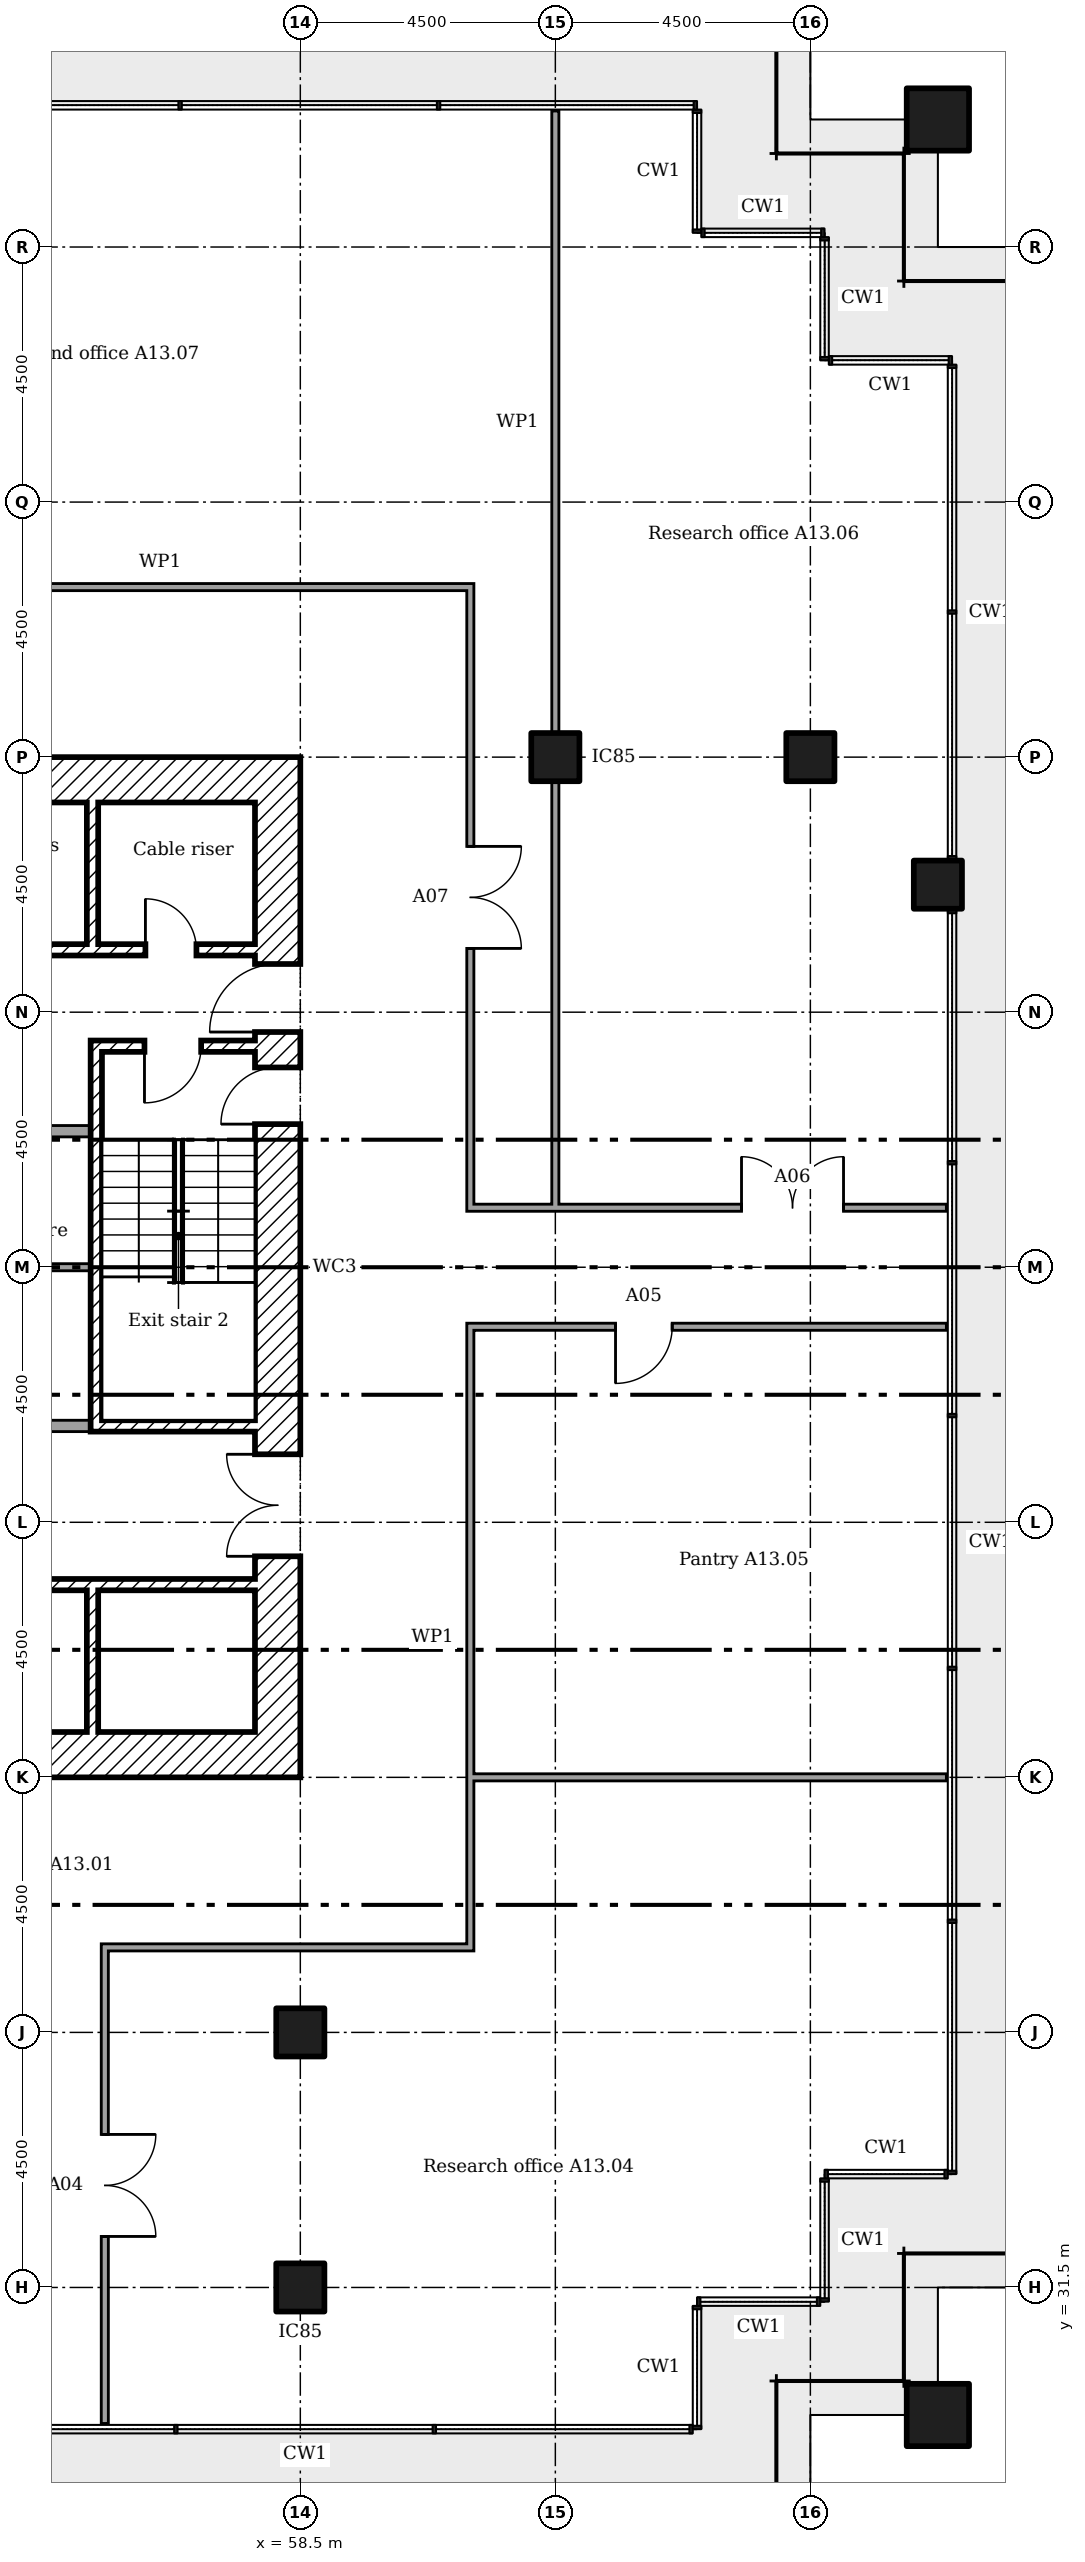
"""IFC4 building model, lengths in metres.
Left out: names, types, materials, properties, quantities, classifications, styles, units other than length and angle.
Written with IfcOpenShell. Run it as: python <this file> out.ifc"""

import sys

from ifc_helpers import new_model, si_unit, direction, frame, frame_2d, origin, origin_2d, place, context, subcontext, project, spatial, rectangle, extrude, element, fill, save


model = new_model("IFC4")
c1 = context("Model", 3, precision=1e-05, world=origin(), true_north=direction((0.0, 1.0)))
c2 = subcontext(c1, "Body", "Model", "MODEL_VIEW")
j1 = project(units=[si_unit("LENGTHUNIT", "METRE"), si_unit("PLANEANGLEUNIT", "RADIAN")], contexts=[c1])
p1 = place(None, origin())
s1 = spatial("IfcSite", under=j1, at=p1, CompositionType="ELEMENT")
p2 = place(p1, origin())
s2 = spatial("IfcBuilding", under=s1, at=p2, CompositionType="ELEMENT")
p3 = place(p2, frame((0.0, 0.0, 58.2)))
s3 = spatial("IfcBuildingStorey", under=s2, at=p3, CompositionType="ELEMENT", Elevation=58.2)
for number, where in (
    (1, (69.75, 29.25, 0.0)),
    (2, (69.75, 69.75, 0.0)),
):
    element("IfcColumn", number, at=place(p3, frame(where)), inside=s3, PredefinedType="COLUMN", context=c2, shape_type="SweptSolid", body=[
        extrude(rectangle(XDim=1.1, YDim=1.1, at=origin_2d()), origin(), (0.0, 0.0, 1.0), 3.6),
    ])
for number, where in (
    (3, (58.5, 31.5, 0.0)),
    (4, (58.5, 36.0, 0.0)),
    (5, (63.0, 58.5, 0.0)),
    (6, (67.5, 58.5, 0.0)),
    (7, (69.75, 56.25, 0.0)),
):
    element("IfcColumn", number, at=place(p3, frame(where)), inside=s3, PredefinedType="COLUMN", context=c2, shape_type="SweptSolid", body=[
        extrude(rectangle(XDim=0.85, YDim=0.85, at=origin_2d()), origin(), (0.0, 0.0, 1.0), 3.6),
    ])
p4 = place(p3, frame((58.1, 40.5, 0.0), z_axis=(0.0, 0.0, 1.0), x_axis=(0.0, 1.0, 0.0)))
e8 = element("IfcWall", 8, at=p4, inside=s3, PredefinedType="SHEAR", context=c2, shape_type="SweptSolid", body=[
    extrude(rectangle(XDim=18.0, YDim=0.8, at=frame_2d((9.0, 0.0))), origin(), (0.0, 0.0, 1.0), 3.35),
])
p5 = place(p4, frame((13.15, 0.0, 0.0)))
e9 = element("IfcOpeningElement", 9, at=p5, cuts=e8, PredefinedType="OPENING", context=c2, shape_type="SweptSolid", body=[
    extrude(rectangle(XDim=1.2, YDim=2.1, at=frame_2d((0.6, 1.05))), frame((0.0, 0.41, 0.0), z_axis=(0.0, -1.0, 0.0), x_axis=(1.0, 0.0, 0.0)), (0.0, 0.0, 1.0), 0.82),
])
p6 = place(p4, frame((3.9, 0.0, 0.0)))
e10 = element("IfcOpeningElement", 10, at=p6, cuts=e8, PredefinedType="OPENING", context=c2, shape_type="SweptSolid", body=[
    extrude(rectangle(XDim=1.8, YDim=2.1, at=frame_2d((0.9, 1.05))), frame((0.0, 0.41, 0.0), z_axis=(0.0, -1.0, 0.0), x_axis=(1.0, 0.0, 0.0)), (0.0, 0.0, 1.0), 0.82),
])
p7 = place(p4, frame((11.525, 0.0, 0.0)))
e11 = element("IfcOpeningElement", 11, at=p7, cuts=e8, PredefinedType="OPENING", context=c2, shape_type="SweptSolid", body=[
    extrude(rectangle(XDim=1.0, YDim=2.1, at=frame_2d((0.5, 1.05))), frame((0.0, 0.41, 0.0), z_axis=(0.0, -1.0, 0.0), x_axis=(1.0, 0.0, 0.0)), (0.0, 0.0, 1.0), 0.82),
])
for number, where in (
    (12, (41.3, 58.1, 0.0)),
    (13, (41.3, 40.9, 0.0)),
):
    element("IfcWall", number, at=place(p3, frame(where)), inside=s3, PredefinedType="SHEAR", context=c2, shape_type="SweptSolid", body=[
        extrude(rectangle(XDim=16.4, YDim=0.8, at=frame_2d((8.2, 0.0))), origin(), (0.0, 0.0, 1.0), 3.35),
    ])
for number, where, z_axis, x_axis in (
    (14, (54.833, 57.7, 0.0), (0.0, 0.0, 1.0), (0.0, -1.0, 0.0)),
    (15, (54.833, 41.3, 0.0), (0.0, 0.0, 1.0), (0.0, 1.0, 0.0)),
):
    element("IfcWall", number, at=place(p3, frame(where, z_axis=z_axis, x_axis=x_axis)), inside=s3, PredefinedType="SHEAR", context=c2, shape_type="SweptSolid", body=[
        extrude(rectangle(XDim=2.5, YDim=0.2, at=frame_2d((1.25, 0.0))), origin(), (0.0, 0.0, 1.0), 3.35),
    ])
p8 = place(p3, frame((46.933, 55.1, 0.0)))
e16 = element("IfcWall", 16, at=p8, inside=s3, PredefinedType="SHEAR", context=c2, shape_type="SweptSolid", body=[
    extrude(rectangle(XDim=10.767, YDim=0.2, at=frame_2d((5.383, 0.0))), origin(), (0.0, 0.0, 1.0), 3.35),
])
p9 = place(p8, frame((8.833, 0.0, 0.0)))
e17 = element("IfcOpeningElement", 17, at=p9, cuts=e16, PredefinedType="OPENING", context=c2, shape_type="SweptSolid", body=[
    extrude(rectangle(XDim=0.9, YDim=2.1, at=frame_2d((0.45, 1.05))), frame((0.0, 0.11, 0.0), z_axis=(0.0, -1.0, 0.0), x_axis=(1.0, 0.0, 0.0)), (0.0, 0.0, 1.0), 0.22),
])
p10 = place(p8, frame((2.117, 0.0, 0.0)))
e18 = element("IfcOpeningElement", 18, at=p10, cuts=e16, PredefinedType="OPENING", context=c2, shape_type="SweptSolid", body=[
    extrude(rectangle(XDim=0.9, YDim=2.1, at=frame_2d((0.45, 1.05))), frame((0.0, 0.11, 0.0), z_axis=(0.0, -1.0, 0.0), x_axis=(1.0, 0.0, 0.0)), (0.0, 0.0, 1.0), 0.22),
])
p11 = place(p8, frame((6.117, 0.0, 0.0)))
e19 = element("IfcOpeningElement", 19, at=p11, cuts=e16, PredefinedType="OPENING", context=c2, shape_type="SweptSolid", body=[
    extrude(rectangle(XDim=0.9, YDim=2.1, at=frame_2d((0.45, 1.05))), frame((0.0, 0.11, 0.0), z_axis=(0.0, -1.0, 0.0), x_axis=(1.0, 0.0, 0.0)), (0.0, 0.0, 1.0), 0.22),
])
p12 = place(p3, frame((41.3, 43.9, 0.0)))
e20 = element("IfcWall", 20, at=p12, inside=s3, PredefinedType="SHEAR", context=c2, shape_type="SweptSolid", body=[
    extrude(rectangle(XDim=16.4, YDim=0.2, at=frame_2d((8.2, 0.0))), origin(), (0.0, 0.0, 1.0), 3.35),
])
p13 = place(p12, frame((0.933, 0.0, 0.0)))
e21 = element("IfcOpeningElement", 21, at=p13, cuts=e20, PredefinedType="OPENING", context=c2, shape_type="SweptSolid", body=[
    extrude(rectangle(XDim=1.2, YDim=2.1, at=frame_2d((0.6, 1.05))), frame((0.0, 0.11, 0.0), z_axis=(0.0, -1.0, 0.0), x_axis=(1.0, 0.0, 0.0)), (0.0, 0.0, 1.0), 0.22),
])
p14 = place(p12, frame((3.6, 0.0, 0.0)))
e22 = element("IfcOpeningElement", 22, at=p14, cuts=e20, PredefinedType="OPENING", context=c2, shape_type="SweptSolid", body=[
    extrude(rectangle(XDim=1.2, YDim=2.1, at=frame_2d((0.6, 1.05))), frame((0.0, 0.11, 0.0), z_axis=(0.0, -1.0, 0.0), x_axis=(1.0, 0.0, 0.0)), (0.0, 0.0, 1.0), 0.22),
])
p15 = place(p12, frame((6.267, 0.0, 0.0)))
e23 = element("IfcOpeningElement", 23, at=p15, cuts=e20, PredefinedType="OPENING", context=c2, shape_type="SweptSolid", body=[
    extrude(rectangle(XDim=1.2, YDim=2.1, at=frame_2d((0.6, 1.05))), frame((0.0, 0.11, 0.0), z_axis=(0.0, -1.0, 0.0), x_axis=(1.0, 0.0, 0.0)), (0.0, 0.0, 1.0), 0.22),
])
p16 = place(p12, frame((8.933, 0.0, 0.0)))
e24 = element("IfcOpeningElement", 24, at=p16, cuts=e20, PredefinedType="OPENING", context=c2, shape_type="SweptSolid", body=[
    extrude(rectangle(XDim=1.2, YDim=2.1, at=frame_2d((0.6, 1.05))), frame((0.0, 0.11, 0.0), z_axis=(0.0, -1.0, 0.0), x_axis=(1.0, 0.0, 0.0)), (0.0, 0.0, 1.0), 0.22),
])
p17 = place(p3, frame((54.8, 53.4, 0.0)))
e25 = element("IfcWall", 25, at=p17, inside=s3, PredefinedType="SHEAR", context=c2, shape_type="SweptSolid", body=[
    extrude(rectangle(XDim=2.9, YDim=0.2, at=frame_2d((1.45, 0.0))), origin(), (0.0, 0.0, 1.0), 3.35),
])
p18 = place(p17, frame((0.95, 0.0, 0.0)))
e26 = element("IfcOpeningElement", 26, at=p18, cuts=e25, PredefinedType="OPENING", context=c2, shape_type="SweptSolid", body=[
    extrude(rectangle(XDim=1.0, YDim=2.1, at=frame_2d((0.5, 1.05))), frame((0.0, 0.11, 0.0), z_axis=(0.0, -1.0, 0.0), x_axis=(1.0, 0.0, 0.0)), (0.0, 0.0, 1.0), 0.22),
])
p19 = place(p3, frame((54.8, 46.7, 0.0)))
e27 = element("IfcWall", 27, at=p19, inside=s3, PredefinedType="SHEAR", context=c2, shape_type="SweptSolid", body=[
    extrude(rectangle(XDim=2.9, YDim=0.2, at=frame_2d((1.45, 0.0))), origin(), (0.0, 0.0, 1.0), 3.35),
])
p20 = place(p3, frame((54.9, 46.8, 0.0), z_axis=(0.0, 0.0, 1.0), x_axis=(0.0, 1.0, 0.0)))
e28 = element("IfcWall", 28, at=p20, inside=s3, PredefinedType="SHEAR", context=c2, shape_type="SweptSolid", body=[
    extrude(rectangle(XDim=6.5, YDim=0.2, at=frame_2d((3.25, 0.0))), origin(), (0.0, 0.0, 1.0), 3.35),
])
p21 = place(p3, frame((44.2, 51.9, 0.0)))
e29 = element("IfcWall", 29, at=p21, inside=s3, PredefinedType="PARTITIONING", context=c2, shape_type="SweptSolid", body=[
    extrude(rectangle(XDim=10.6, YDim=0.2, at=frame_2d((5.3, 0.0))), origin(), (0.0, 0.0, 1.0), 3.35),
])
p22 = place(p21, frame((8.5, 0.0, 0.0)))
e30 = element("IfcOpeningElement", 30, at=p22, cuts=e29, PredefinedType="OPENING", context=c2, shape_type="SweptSolid", body=[
    extrude(rectangle(XDim=0.9, YDim=2.1, at=frame_2d((0.45, 1.05))), frame((0.0, 0.11, 0.0), z_axis=(0.0, -1.0, 0.0), x_axis=(1.0, 0.0, 0.0)), (0.0, 0.0, 1.0), 0.22),
])
p23 = place(p3, frame((44.2, 46.7, 0.0)))
e31 = element("IfcWall", 31, at=p23, inside=s3, PredefinedType="PARTITIONING", context=c2, shape_type="SweptSolid", body=[
    extrude(rectangle(XDim=10.6, YDim=0.2, at=frame_2d((5.3, 0.0))), origin(), (0.0, 0.0, 1.0), 3.35),
])
p24 = place(p23, frame((2.0, 0.0, 0.0)))
e32 = element("IfcOpeningElement", 32, at=p24, cuts=e31, PredefinedType="OPENING", context=c2, shape_type="SweptSolid", body=[
    extrude(rectangle(XDim=0.9, YDim=2.1, at=frame_2d((0.45, 1.05))), frame((0.0, 0.11, 0.0), z_axis=(0.0, -1.0, 0.0), x_axis=(1.0, 0.0, 0.0)), (0.0, 0.0, 1.0), 0.22),
])
p25 = place(p23, frame((5.65, 0.0, 0.0)))
e33 = element("IfcOpeningElement", 33, at=p25, cuts=e31, PredefinedType="OPENING", context=c2, shape_type="SweptSolid", body=[
    extrude(rectangle(XDim=0.9, YDim=2.1, at=frame_2d((0.45, 1.05))), frame((0.0, 0.11, 0.0), z_axis=(0.0, -1.0, 0.0), x_axis=(1.0, 0.0, 0.0)), (0.0, 0.0, 1.0), 0.22),
])
p26 = place(p23, frame((8.5, 0.0, 0.0)))
e34 = element("IfcOpeningElement", 34, at=p26, cuts=e31, PredefinedType="OPENING", context=c2, shape_type="SweptSolid", body=[
    extrude(rectangle(XDim=0.9, YDim=2.1, at=frame_2d((0.45, 1.05))), frame((0.0, 0.11, 0.0), z_axis=(0.0, -1.0, 0.0), x_axis=(1.0, 0.0, 0.0)), (0.0, 0.0, 1.0), 0.22),
])
p27 = place(p3, frame((51.562, 49.5, 0.0)))
e35 = element("IfcWall", 35, at=p27, inside=s3, PredefinedType="PARTITIONING", context=c2, shape_type="SweptSolid", body=[
    extrude(rectangle(XDim=3.238, YDim=0.125, at=frame_2d((1.619, 0.0))), origin(), (0.0, 0.0, 1.0), 3.35),
])
p28 = place(p3, frame((54.988, 37.5, 0.0)))
e36 = element("IfcWall", 36, at=p28, inside=s3, PredefinedType="PARTITIONING", context=c2, shape_type="SweptSolid", body=[
    extrude(rectangle(XDim=6.575, YDim=0.125, at=frame_2d((3.288, 0.0))), origin(), (0.0, 0.0, 1.0), 3.45),
])
p29 = place(p3, frame((61.5, 40.5, 0.0)))
e37 = element("IfcWall", 37, at=p29, inside=s3, PredefinedType="PARTITIONING", context=c2, shape_type="SweptSolid", body=[
    extrude(rectangle(XDim=8.4, YDim=0.125, at=frame_2d((4.2, 0.0))), origin(), (0.0, 0.0, 1.0), 2.766),
])
p30 = place(p3, frame((61.438, 48.45, 0.0)))
e38 = element("IfcWall", 38, at=p30, inside=s3, PredefinedType="PARTITIONING", context=c2, shape_type="SweptSolid", body=[
    extrude(rectangle(XDim=8.462, YDim=0.125, at=frame_2d((4.231, 0.0))), origin(), (0.0, 0.0, 1.0), 3.45),
])
p31 = place(p30, frame((2.625, 0.0, 0.0)))
e39 = element("IfcOpeningElement", 39, at=p31, cuts=e38, PredefinedType="OPENING", context=c2, shape_type="SweptSolid", body=[
    extrude(rectangle(XDim=1.0, YDim=2.1, at=frame_2d((0.5, 1.05))), frame((0.0, 0.073, 0.0), z_axis=(0.0, -1.0, 0.0), x_axis=(1.0, 0.0, 0.0)), (0.0, 0.0, 1.0), 0.145),
])
p32 = place(p3, frame((61.438, 50.55, 0.0)))
e40 = element("IfcWall", 40, at=p32, inside=s3, PredefinedType="PARTITIONING", context=c2, shape_type="SweptSolid", body=[
    extrude(rectangle(XDim=8.462, YDim=0.125, at=frame_2d((4.231, 0.0))), origin(), (0.0, 0.0, 1.0), 3.45),
])
p33 = place(p32, frame((4.847, 0.0, 0.0)))
e41 = element("IfcOpeningElement", 41, at=p33, cuts=e40, PredefinedType="OPENING", context=c2, shape_type="SweptSolid", body=[
    extrude(rectangle(XDim=1.8, YDim=2.1, at=frame_2d((0.9, 1.05))), frame((0.0, 0.073, 0.0), z_axis=(0.0, -1.0, 0.0), x_axis=(1.0, 0.0, 0.0)), (0.0, 0.0, 1.0), 0.145),
])
p34 = place(p3, frame((50.488, 61.5, 0.0)))
e42 = element("IfcWall", 42, at=p34, inside=s3, PredefinedType="PARTITIONING", context=c2, shape_type="SweptSolid", body=[
    extrude(rectangle(XDim=11.075, YDim=0.125, at=frame_2d((5.538, 0.0))), origin(), (0.0, 0.0, 1.0), 3.45),
])
p35 = place(p3, frame((55.05, 29.1, 0.0), z_axis=(0.0, 0.0, 1.0), x_axis=(0.0, 1.0, 0.0)))
e43 = element("IfcWall", 43, at=p35, inside=s3, PredefinedType="PARTITIONING", context=c2, shape_type="SweptSolid", body=[
    extrude(rectangle(XDim=8.337, YDim=0.125, at=frame_2d((4.169, 0.0))), origin(), (0.0, 0.0, 1.0), 3.45),
])
p36 = place(p35, frame((3.3, 0.0, 0.0)))
e44 = element("IfcOpeningElement", 44, at=p36, cuts=e43, PredefinedType="OPENING", context=c2, shape_type="SweptSolid", body=[
    extrude(rectangle(XDim=1.8, YDim=2.1, at=frame_2d((0.9, 1.05))), frame((0.0, 0.073, 0.0), z_axis=(0.0, -1.0, 0.0), x_axis=(1.0, 0.0, 0.0)), (0.0, 0.0, 1.0), 0.145),
])
p37 = place(p3, frame((61.5, 37.562, 0.0), z_axis=(0.0, 0.0, 1.0), x_axis=(0.0, 1.0, 0.0)))
e45 = element("IfcWall", 45, at=p37, inside=s3, PredefinedType="PARTITIONING", context=c2, shape_type="SweptSolid", body=[
    extrude(rectangle(XDim=10.825, YDim=0.125, at=frame_2d((5.413, 0.0))), origin(), (0.0, 0.0, 1.0), 3.45),
])
p38 = place(p3, frame((61.5, 50.613, 0.0), z_axis=(0.0, 0.0, 1.0), x_axis=(0.0, 1.0, 0.0)))
e46 = element("IfcWall", 46, at=p38, inside=s3, PredefinedType="PARTITIONING", context=c2, shape_type="SweptSolid", body=[
    extrude(rectangle(XDim=10.825, YDim=0.125, at=frame_2d((5.413, 0.0))), origin(), (0.0, 0.0, 1.0), 3.45),
])
p39 = place(p38, frame((4.512, 0.0, 0.0)))
e47 = element("IfcOpeningElement", 47, at=p39, cuts=e46, PredefinedType="OPENING", context=c2, shape_type="SweptSolid", body=[
    extrude(rectangle(XDim=1.8, YDim=2.1, at=frame_2d((0.9, 1.05))), frame((0.0, 0.073, 0.0), z_axis=(0.0, -1.0, 0.0), x_axis=(1.0, 0.0, 0.0)), (0.0, 0.0, 1.0), 0.145),
])
p40 = place(p3, frame((63.0, 50.55, 0.0), z_axis=(0.0, 0.0, 1.0), x_axis=(0.0, 1.0, 0.0)))
e48 = element("IfcWall", 48, at=p40, inside=s3, PredefinedType="PARTITIONING", context=c2, shape_type="SweptSolid", body=[
    extrude(rectangle(XDim=7.525, YDim=0.125, at=frame_2d((3.762, 0.0))), origin(), (0.0, 0.0, 1.0), 3.45),
])
p41 = place(p3, frame((63.0, 58.925, 0.0), z_axis=(0.0, 0.0, 1.0), x_axis=(0.0, 1.0, 0.0)))
e49 = element("IfcWall", 49, at=p41, inside=s3, PredefinedType="PARTITIONING", context=c2, shape_type="SweptSolid", body=[
    extrude(rectangle(XDim=10.975, YDim=0.125, at=frame_2d((5.487, 0.0))), origin(), (0.0, 0.0, 1.0), 2.766),
])
p42 = place(p5, origin())
e50 = element("IfcDoor", 50, at=p42, inside=s3, OperationType="SINGLE_SWING_RIGHT", PredefinedType="DOOR", context=c2, shape_type="SweptSolid", body=[
    extrude(rectangle(XDim=1.2, YDim=2.1, at=frame_2d((0.6, 1.05))), frame((0.0, 0.025, 0.0), z_axis=(0.0, -1.0, 0.0), x_axis=(1.0, 0.0, 0.0)), (0.0, 0.0, 1.0), 0.05),
])
fill(e9, e50)
p43 = place(p6, origin())
e51 = element("IfcDoor", 51, at=p43, inside=s3, OperationType="DOUBLE_DOOR_SINGLE_SWING", PredefinedType="DOOR", context=c2, shape_type="SweptSolid", body=[
    extrude(rectangle(XDim=1.8, YDim=2.1, at=frame_2d((0.9, 1.05))), frame((0.0, 0.025, 0.0), z_axis=(0.0, -1.0, 0.0), x_axis=(1.0, 0.0, 0.0)), (0.0, 0.0, 1.0), 0.05),
])
fill(e10, e51)
p44 = place(p18, frame((1.0, 0.0, 0.0), x_axis=(-1.0, 0.0, 0.0)))
e52 = element("IfcDoor", 52, at=p44, inside=s3, OperationType="SINGLE_SWING_LEFT", PredefinedType="DOOR", context=c2, shape_type="SweptSolid", body=[
    extrude(rectangle(XDim=1.0, YDim=2.1, at=frame_2d((0.5, 1.05))), frame((0.0, 0.025, 0.0), z_axis=(0.0, -1.0, 0.0), x_axis=(1.0, 0.0, 0.0)), (0.0, 0.0, 1.0), 0.05),
])
fill(e26, e52)
p45 = place(p7, origin())
e53 = element("IfcDoor", 53, at=p45, inside=s3, OperationType="SINGLE_SWING_RIGHT", PredefinedType="DOOR", context=c2, shape_type="SweptSolid", body=[
    extrude(rectangle(XDim=1.0, YDim=2.1, at=frame_2d((0.5, 1.05))), frame((0.0, 0.025, 0.0), z_axis=(0.0, -1.0, 0.0), x_axis=(1.0, 0.0, 0.0)), (0.0, 0.0, 1.0), 0.05),
])
fill(e11, e53)
p46 = place(p9, origin())
e54 = element("IfcDoor", 54, at=p46, inside=s3, OperationType="SINGLE_SWING_RIGHT", PredefinedType="DOOR", context=c2, shape_type="SweptSolid", body=[
    extrude(rectangle(XDim=0.9, YDim=2.1, at=frame_2d((0.45, 1.05))), frame((0.0, 0.025, 0.0), z_axis=(0.0, -1.0, 0.0), x_axis=(1.0, 0.0, 0.0)), (0.0, 0.0, 1.0), 0.05),
])
fill(e17, e54)
p47 = place(p36, frame((1.8, 0.0, 0.0), x_axis=(-1.0, 0.0, 0.0)))
e55 = element("IfcDoor", 55, at=p47, inside=s3, OperationType="DOUBLE_DOOR_SINGLE_SWING", PredefinedType="DOOR", context=c2, shape_type="SweptSolid", body=[
    extrude(rectangle(XDim=1.8, YDim=2.1, at=frame_2d((0.9, 1.05))), frame((0.0, 0.025, 0.0), z_axis=(0.0, -1.0, 0.0), x_axis=(1.0, 0.0, 0.0)), (0.0, 0.0, 1.0), 0.05),
])
fill(e44, e55)
p48 = place(p31, frame((1.0, 0.0, 0.0), x_axis=(-1.0, 0.0, 0.0)))
e56 = element("IfcDoor", 56, at=p48, inside=s3, OperationType="SINGLE_SWING_LEFT", PredefinedType="DOOR", context=c2, shape_type="SweptSolid", body=[
    extrude(rectangle(XDim=1.0, YDim=2.1, at=frame_2d((0.5, 1.05))), frame((0.0, 0.025, 0.0), z_axis=(0.0, -1.0, 0.0), x_axis=(1.0, 0.0, 0.0)), (0.0, 0.0, 1.0), 0.05),
])
fill(e39, e56)
p49 = place(p33, origin())
e57 = element("IfcDoor", 57, at=p49, inside=s3, OperationType="DOUBLE_DOOR_SINGLE_SWING", PredefinedType="DOOR", context=c2, shape_type="SweptSolid", body=[
    extrude(rectangle(XDim=1.8, YDim=2.1, at=frame_2d((0.9, 1.05))), frame((0.0, 0.025, 0.0), z_axis=(0.0, -1.0, 0.0), x_axis=(1.0, 0.0, 0.0)), (0.0, 0.0, 1.0), 0.05),
])
fill(e41, e57)
p50 = place(p39, frame((1.8, 0.0, 0.0), x_axis=(-1.0, 0.0, 0.0)))
e58 = element("IfcDoor", 58, at=p50, inside=s3, OperationType="DOUBLE_DOOR_SINGLE_SWING", PredefinedType="DOOR", context=c2, shape_type="SweptSolid", body=[
    extrude(rectangle(XDim=1.8, YDim=2.1, at=frame_2d((0.9, 1.05))), frame((0.0, 0.025, 0.0), z_axis=(0.0, -1.0, 0.0), x_axis=(1.0, 0.0, 0.0)), (0.0, 0.0, 1.0), 0.05),
])
fill(e47, e58)
save(model, sys.argv[1])
